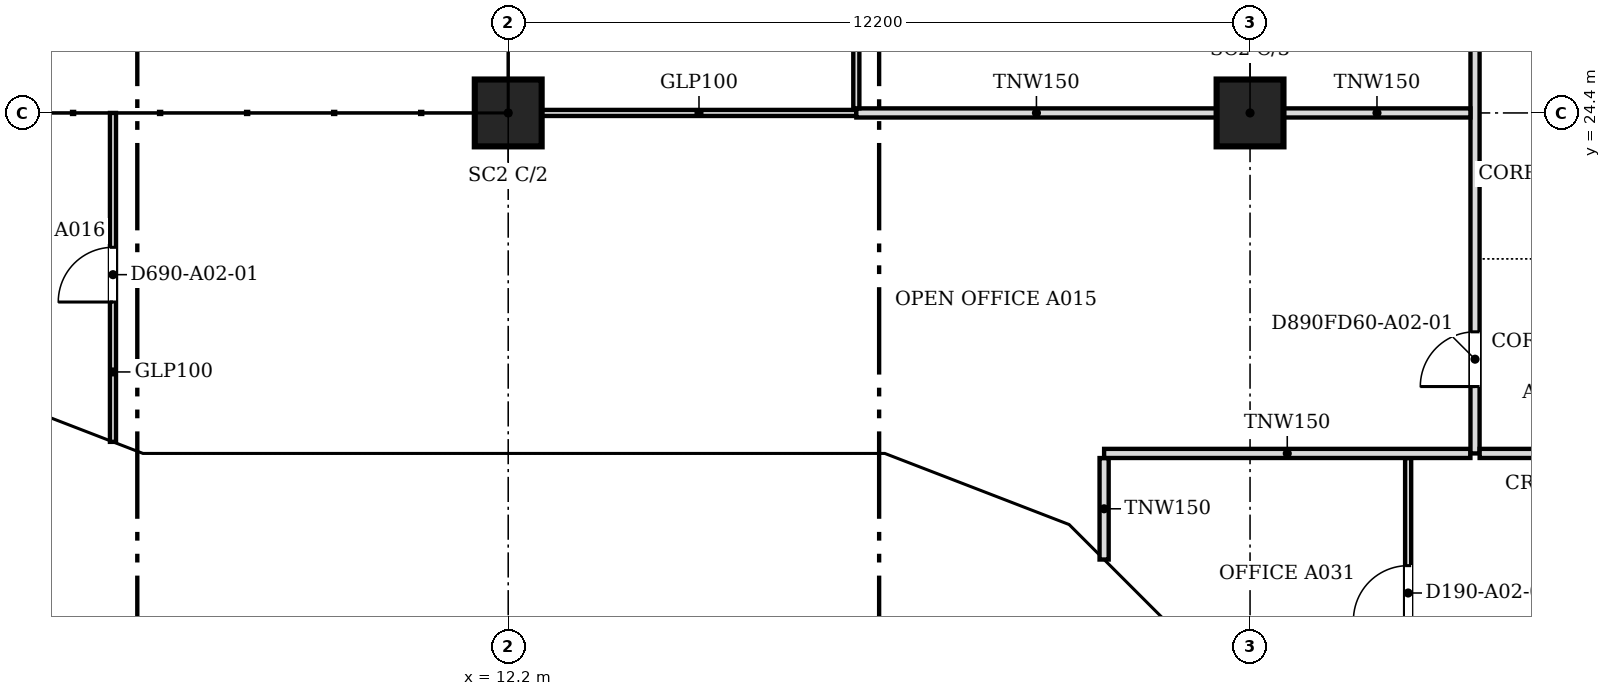
"""IFC4 building model, lengths in metres.
Left out: names, types, materials, properties, quantities, classifications, styles, units other than length and angle.
Written with IfcOpenShell. Run it as: python <this file> out.ifc"""

import sys

from ifc_helpers import new_model, si_unit, direction, frame, frame_2d, origin, origin_2d, place, context, subcontext, project, spatial, polyline, rectangle, outline, extrude, faceted_brep, source, transform, mapped, element, fill, save


model = new_model("IFC4")
c1 = context("Model", 3, precision=1e-05, world=origin(), true_north=direction((0.0, 1.0)))
c2 = subcontext(c1, "Body", "Model", "MODEL_VIEW")
j1 = project(units=[si_unit("LENGTHUNIT", "METRE"), si_unit("PLANEANGLEUNIT", "RADIAN")], contexts=[c1])
p1 = place(None, origin())
s1 = spatial("IfcSite", under=j1, at=p1, CompositionType="ELEMENT")
p2 = place(p1, origin())
s2 = spatial("IfcBuilding", under=s1, at=p2, CompositionType="ELEMENT")
p3 = place(p2, frame((0.0, 0.0, 25.8)))
s3 = spatial("IfcBuildingStorey", under=s2, at=p3, CompositionType="ELEMENT", Elevation=25.8)
for number, where, z_axis, x_axis in (
    (1, (12.2, 24.4, 0.0), (0.0, 0.0, 1.0), (1.0, 0.0, 0.0)),
    (2, (24.4, 24.4, 0.0), (0.0, 0.0, 1.0), (1.0, 0.0, 0.0)),
):
    element("IfcColumn", number, at=place(p3, frame(where, z_axis=z_axis, x_axis=x_axis)), inside=s3, PredefinedType="COLUMN", context=c2, shape_type="SweptSolid", body=[
        extrude(rectangle(XDim=1.1, YDim=1.1, at=origin_2d()), origin(), (0.0, 0.0, 1.0), 3.6),
    ])
m1 = source(origin(), c2, "Body", "Brep", [
    faceted_brep([(2.997, -0.25, 3.741), (2.95, -0.25, 3.8), (0.0, -0.25, 0.0), (2.997, -0.25, 0.0), (0.053, 0.25, 0.068), (2.904, 0.25, 3.74), (2.904, 0.25, 0.0), (0.053, 0.25, 0.0), (2.95, 0.0, 3.8), (0.0, 0.0, 0.0)], [[[0, 1, 2, 3]], [[4, 5, 6, 7]], [[8, 1, 0]], [[5, 4, 9, 2, 1, 8]], [[7, 6, 3, 2, 9]], [[7, 9, 4]], [[3, 6, 5, 8, 0]]]),
])
p4 = place(p3, frame((3.394, 19.612, 0.0), z_axis=(0.0, 0.0, 1.0), x_axis=(0.932990326376, -0.359901446078, 0.0)))
e3 = element("IfcWall", 3, at=p4, inside=s3, PredefinedType="SOLIDWALL", context=c2, shape_type="MappedRepresentation", body=[
    mapped(m1, transform((0.0, 0.0, 0.0), scale=1.0)),
])
m2 = source(origin(), c2, "Body", "SweptSolid", [
    extrude(outline(polyline([(2.75, 3.135), (0.511, 0.25), (2.75, 0.25), (2.75, 3.135)])), frame((0.0, 0.26, 0.0), z_axis=(0.0, -1.0, 0.0), x_axis=(1.0, 0.0, 0.0)), (0.0, 0.0, 1.0), 0.52),
])
p5 = place(p4, origin())
e4 = element("IfcOpeningElement", 4, at=p5, cuts=e3, PredefinedType="OPENING", context=c2, shape_type="MappedRepresentation", body=[
    mapped(m2, transform((0.0, 0.0, 0.0), scale=1.0)),
])
m3 = source(origin(), c2, "Body", "Brep", [
    faceted_brep([(3.05, -0.25, 0.0), (0.047, -0.25, 3.8), (0.0, -0.25, 3.74), (0.0, -0.25, 0.0), (0.093, 0.25, 3.741), (3.05, 0.25, 0.0), (0.093, 0.25, 0.0), (0.047, 0.0, 3.8)], [[[0, 1, 2, 3]], [[4, 5, 6]], [[5, 4, 7, 1, 0]], [[2, 1, 7]], [[6, 5, 0, 3]], [[6, 3, 2, 7, 4]]]),
])
p6 = place(p3, frame((6.1, 18.55, 0.0), z_axis=(0.0, 0.0, 1.0), x_axis=(1.0, 0.0, 0.0)))
e5 = element("IfcWall", 5, at=p6, inside=s3, PredefinedType="SOLIDWALL", context=c2, shape_type="MappedRepresentation", body=[
    mapped(m3, transform((0.0, 0.0, 0.0), scale=1.0)),
])
m4 = source(origin(), c2, "Body", "SweptSolid", [
    extrude(outline(polyline([(2.534, 0.25), (0.247, 3.144), (0.247, 0.25), (2.534, 0.25)])), frame((0.0, 0.26, 0.0), z_axis=(0.0, -1.0, 0.0), x_axis=(1.0, 0.0, 0.0)), (0.0, 0.0, 1.0), 0.52),
])
p7 = place(p6, origin())
e6 = element("IfcOpeningElement", 6, at=p7, cuts=e5, PredefinedType="OPENING", context=c2, shape_type="MappedRepresentation", body=[
    mapped(m4, transform((0.0, 0.0, 0.0), scale=1.0)),
])
m5 = source(origin(), c2, "Body", "SweptSolid", [
    extrude(outline(polyline([(6.1, 0.0), (3.05, 3.8), (0.0, 0.0), (6.1, 0.0)])), frame((0.0, 0.25, 0.0), z_axis=(0.0, -1.0, 0.0), x_axis=(1.0, 0.0, 0.0)), (0.0, 0.0, 1.0), 0.5),
])
p8 = place(p3, frame((9.15, 18.55, 0.0), z_axis=(0.0, 0.0, 1.0), x_axis=(1.0, 0.0, 0.0)))
e7 = element("IfcWall", 7, at=p8, inside=s3, PredefinedType="SOLIDWALL", context=c2, shape_type="MappedRepresentation", body=[
    mapped(m5, transform((0.0, 0.0, 0.0), scale=1.0)),
])
m6 = source(origin(), c2, "Body", "SweptSolid", [
    extrude(outline(polyline([(5.579, 0.25), (3.05, 3.401), (0.521, 0.25), (5.579, 0.25)])), frame((0.0, 0.26, 0.0), z_axis=(0.0, -1.0, 0.0), x_axis=(1.0, 0.0, 0.0)), (0.0, 0.0, 1.0), 0.52),
])
p9 = place(p8, origin())
e8 = element("IfcOpeningElement", 8, at=p9, cuts=e7, PredefinedType="OPENING", context=c2, shape_type="MappedRepresentation", body=[
    mapped(m6, transform((0.0, 0.0, 0.0), scale=1.0)),
])
m7 = source(origin(), c2, "Body", "Brep", [
    faceted_brep([(3.05, -0.25, 3.743), (0.0, -0.25, 0.0), (3.05, -0.25, 0.0), (0.0, 0.25, 0.0), (3.096, 0.25, 3.8), (3.143, 0.25, 3.744), (3.143, 0.25, 0.0), (3.096, -0.0, 3.8)], [[[0, 1, 2]], [[3, 4, 5, 6]], [[5, 4, 7]], [[4, 3, 1, 0, 7]], [[3, 6, 2, 1]], [[2, 6, 5, 7, 0]]]),
])
p10 = place(p3, frame((15.25, 18.55, 0.0), z_axis=(0.0, 0.0, 1.0), x_axis=(1.0, 0.0, 0.0)))
e9 = element("IfcWall", 9, at=p10, inside=s3, PredefinedType="SOLIDWALL", context=c2, shape_type="MappedRepresentation", body=[
    mapped(m7, transform((0.0, 0.0, 0.0), scale=1.0)),
])
m8 = source(origin(), c2, "Body", "SweptSolid", [
    extrude(outline(polyline([(2.896, 3.159), (0.526, 0.25), (2.896, 0.25), (2.896, 3.159)])), frame((0.0, 0.26, 0.0), z_axis=(0.0, -1.0, 0.0), x_axis=(1.0, 0.0, 0.0)), (0.0, 0.0, 1.0), 0.52),
])
p11 = place(p10, origin())
e10 = element("IfcOpeningElement", 10, at=p11, cuts=e9, PredefinedType="OPENING", context=c2, shape_type="MappedRepresentation", body=[
    mapped(m8, transform((0.0, 0.0, 0.0), scale=1.0)),
])
m9 = source(origin(), c2, "Body", "Brep", [
    faceted_brep([(3.143, -0.25, 0.064), (0.093, -0.25, 3.744), (0.093, -0.25, 0.0), (3.143, -0.25, 0.0), (0.0, 0.25, 3.743), (0.047, 0.25, 3.8), (3.196, 0.25, 0.0), (0.0, 0.25, 0.0), (0.047, 0.0, 3.8), (3.196, -0.0, 0.0)], [[[0, 1, 2, 3]], [[4, 5, 6, 7]], [[6, 5, 8, 1, 0, 9]], [[5, 4, 8]], [[7, 6, 9, 3, 2]], [[7, 2, 1, 8, 4]], [[3, 9, 0]]]),
])
p12 = place(p3, frame((18.303, 18.567, 0.0), z_axis=(0.0, 0.0, 1.0), x_axis=(0.932978940178, -0.359930961693, 0.0)))
e11 = element("IfcWall", 11, at=p12, inside=s3, PredefinedType="SOLIDWALL", context=c2, shape_type="MappedRepresentation", body=[
    mapped(m9, transform((0.0, 0.0, 0.0), scale=1.0)),
])
m10 = source(origin(), c2, "Body", "SweptSolid", [
    extrude(outline(polyline([(2.664, 0.25), (0.247, 3.167), (0.247, 0.25), (2.664, 0.25)])), frame((0.0, 0.26, 0.0), z_axis=(0.0, -1.0, 0.0), x_axis=(1.0, 0.0, 0.0)), (0.0, 0.0, 1.0), 0.52),
])
p13 = place(p12, origin())
e12 = element("IfcOpeningElement", 12, at=p13, cuts=e11, PredefinedType="OPENING", context=c2, shape_type="MappedRepresentation", body=[
    mapped(m10, transform((0.0, 0.0, 0.0), scale=1.0)),
])
m11 = source(origin(), c2, "Body", "Brep", [
    faceted_brep([(3.103, -0.25, 3.736), (0.053, -0.25, 0.064), (0.053, -0.25, 0.0), (3.103, -0.25, 0.0), (0.0, 0.25, 0.0), (3.156, 0.25, 3.8), (3.209, 0.25, 3.736), (3.209, 0.25, 0.0), (3.156, -0.0, 3.8), (0.0, 0.0, 0.0)], [[[0, 1, 2, 3]], [[4, 5, 6, 7]], [[6, 5, 8]], [[5, 4, 9, 1, 0, 8]], [[4, 7, 3, 2, 9]], [[9, 2, 1]], [[3, 7, 6, 8, 0]]]),
])
p14 = place(p3, frame((21.285, 17.417, 0.0), z_axis=(0.0, 0.0, 1.0), x_axis=(0.707106781187, -0.707106781187, 0.0)))
e13 = element("IfcWall", 13, at=p14, inside=s3, PredefinedType="SOLIDWALL", context=c2, shape_type="MappedRepresentation", body=[
    mapped(m11, transform((0.0, 0.0, 0.0), scale=1.0)),
])
m12 = source(origin(), c2, "Body", "SweptSolid", [
    extrude(outline(polyline([(2.956, 3.168), (0.533, 0.25), (2.956, 0.25), (2.956, 3.168)])), frame((0.0, 0.26, 0.0), z_axis=(0.0, -1.0, 0.0), x_axis=(1.0, 0.0, 0.0)), (0.0, 0.0, 1.0), 0.52),
])
p15 = place(p14, origin())
e14 = element("IfcOpeningElement", 14, at=p15, cuts=e13, PredefinedType="OPENING", context=c2, shape_type="MappedRepresentation", body=[
    mapped(m12, transform((0.0, 0.0, 0.0), scale=1.0)),
])
p16 = place(p2, frame((0.0, 0.0, 29.6)))
s4 = spatial("IfcBuildingStorey", under=s2, at=p16, CompositionType="ELEMENT", Elevation=29.6)
m13 = source(origin(), c2, "Body", "Brep", [
    faceted_brep([(0.053, -0.25, 0.0), (3.003, -0.25, 3.8), (0.053, -0.25, 7.6), (0.0, -0.25, 7.531), (0.0, -0.25, 0.068), (0.106, 0.25, 7.532), (2.957, 0.25, 3.86), (2.957, 0.25, 3.74), (0.106, 0.25, 0.068), (3.003, 0.0, 3.8), (0.053, 0.0, 0.0), (0.053, 0.0, 7.6)], [[[0, 1, 2, 3, 4]], [[5, 6, 7, 8]], [[8, 7, 9, 1, 0, 10]], [[6, 5, 11, 2, 1, 9]], [[3, 2, 11]], [[10, 0, 4]], [[8, 10, 4, 3, 11, 5]], [[7, 6, 9]]]),
])
p17 = place(p16, frame((3.344, 19.631, -3.8), z_axis=(0.0, 0.0, 1.0), x_axis=(0.933007896601, -0.359855894603, 0.0)))
e15 = element("IfcWall", 15, at=p17, inside=s4, PredefinedType="SOLIDWALL", context=c2, shape_type="MappedRepresentation", body=[
    mapped(m13, transform((0.0, 0.0, 0.0), scale=1.0)),
])
m14 = source(origin(), c2, "Body", "SweptSolid", [
    extrude(outline(polyline([(0.253, 0.665), (2.687, 3.8), (0.253, 6.935), (0.253, 0.665)])), frame((0.0, 0.26, 0.0), z_axis=(0.0, -1.0, 0.0), x_axis=(1.0, 0.0, 0.0)), (0.0, 0.0, 1.0), 0.52),
])
p18 = place(p17, origin())
e16 = element("IfcOpeningElement", 16, at=p18, cuts=e15, PredefinedType="OPENING", context=c2, shape_type="MappedRepresentation", body=[
    mapped(m14, transform((0.0, 0.0, 0.0), scale=1.0)),
])
m15 = source(origin(), c2, "Body", "Brep", [
    faceted_brep([(3.003, -0.25, 0.0), (6.053, -0.25, 3.8), (3.003, -0.25, 7.6), (0.0, -0.25, 3.8), (0.047, 0.25, 3.859), (3.003, 0.25, 7.6), (6.053, 0.25, 3.8), (3.003, 0.25, 0.0), (0.047, 0.25, 3.741), (0.0, 0.0, 3.8)], [[[0, 1, 2, 3]], [[4, 5, 6, 7, 8]], [[7, 6, 1, 0]], [[6, 5, 2, 1]], [[5, 4, 9, 3, 2]], [[8, 7, 0, 3, 9]], [[8, 9, 4]]]),
])
p19 = place(p16, frame((6.146, 18.55, -3.8), z_axis=(0.0, 0.0, 1.0), x_axis=(1.0, 0.0, 0.0)))
e17 = element("IfcWall", 17, at=p19, inside=s4, PredefinedType="SOLIDWALL", context=c2, shape_type="MappedRepresentation", body=[
    mapped(m15, transform((0.0, 0.0, 0.0), scale=1.0)),
])
m16 = source(origin(), c2, "Body", "SweptSolid", [
    extrude(outline(polyline([(3.005, 0.401), (5.733, 3.8), (3.005, 7.199), (0.319, 3.8), (3.005, 0.401)])), frame((0.0, 0.26, 0.0), z_axis=(0.0, -1.0, 0.0), x_axis=(1.0, 0.0, 0.0)), (0.0, 0.0, 1.0), 0.52),
])
p20 = place(p19, origin())
e18 = element("IfcOpeningElement", 18, at=p20, cuts=e17, PredefinedType="OPENING", context=c2, shape_type="MappedRepresentation", body=[
    mapped(m16, transform((0.0, 0.0, 0.0), scale=1.0)),
])
m17 = source(origin(), c2, "Body", "Brep", [
    faceted_brep([(3.05, -0.25, 0.0), (6.1, -0.25, 3.743), (6.1, -0.25, 3.857), (3.05, -0.25, 7.6), (0.0, -0.25, 3.8), (0.0, 0.25, 3.8), (3.05, 0.25, 7.6), (6.146, 0.25, 3.8), (3.05, 0.25, 0.0), (6.146, -0.0, 3.8)], [[[0, 1, 2, 3, 4]], [[5, 6, 7, 8]], [[8, 7, 9, 1, 0]], [[7, 6, 3, 2, 9]], [[6, 5, 4, 3]], [[5, 8, 0, 4]], [[1, 9, 2]]]),
])
p21 = place(p16, frame((12.2, 18.55, -3.8), z_axis=(0.0, 0.0, 1.0), x_axis=(1.0, 0.0, 0.0)))
e19 = element("IfcWall", 19, at=p21, inside=s4, PredefinedType="SOLIDWALL", context=c2, shape_type="MappedRepresentation", body=[
    mapped(m17, transform((0.0, 0.0, 0.0), scale=1.0)),
])
m18 = source(origin(), c2, "Body", "SweptSolid", [
    extrude(outline(polyline([(3.052, 0.397), (5.824, 3.8), (3.052, 7.202), (0.321, 3.8), (3.052, 0.397)])), frame((0.0, 0.26, 0.0), z_axis=(0.0, -1.0, 0.0), x_axis=(1.0, 0.0, 0.0)), (0.0, 0.0, 1.0), 0.52),
])
p22 = place(p21, origin())
e20 = element("IfcOpeningElement", 20, at=p22, cuts=e19, PredefinedType="OPENING", context=c2, shape_type="MappedRepresentation", body=[
    mapped(m18, transform((0.0, 0.0, 0.0), scale=1.0)),
])
m19 = source(origin(), c2, "Body", "Brep", [
    faceted_brep([(3.096, -0.25, 7.536), (0.047, -0.25, 3.856), (0.047, -0.25, 3.744), (3.096, -0.25, 0.064), (0.0, 0.25, 3.8), (3.149, 0.25, 7.6), (3.202, 0.25, 7.536), (3.202, 0.25, 0.064), (3.149, 0.25, 0.0), (3.149, -0.0, 0.0), (3.149, -0.0, 7.6), (0.0, 0.0, 3.8)], [[[0, 1, 2, 3]], [[4, 5, 6, 7, 8]], [[8, 7, 9]], [[6, 5, 10]], [[5, 4, 11, 1, 0, 10]], [[4, 8, 9, 3, 2, 11]], [[2, 1, 11]], [[3, 9, 7, 6, 10, 0]]]),
])
p23 = place(p16, frame((18.346, 18.55, -3.8), z_axis=(0.0, 0.0, 1.0), x_axis=(0.932985567668, -0.359913782069, 0.0)))
e21 = element("IfcWall", 21, at=p23, inside=s4, PredefinedType="SOLIDWALL", context=c2, shape_type="MappedRepresentation", body=[
    mapped(m19, transform((0.0, 0.0, 0.0), scale=1.0)),
])
m20 = source(origin(), c2, "Body", "SweptSolid", [
    extrude(outline(polyline([(2.949, 6.967), (0.325, 3.8), (2.949, 0.633), (2.949, 6.967)])), frame((0.0, 0.26, 0.0), z_axis=(0.0, -1.0, 0.0), x_axis=(1.0, 0.0, 0.0)), (0.0, 0.0, 1.0), 0.52),
])
p24 = place(p23, origin())
e22 = element("IfcOpeningElement", 22, at=p24, cuts=e21, PredefinedType="OPENING", context=c2, shape_type="MappedRepresentation", body=[
    mapped(m20, transform((0.0, 0.0, 0.0), scale=1.0)),
])
m21 = source(origin(), c2, "Body", "Brep", [
    faceted_brep([(0.106, -0.25, 0.064), (3.156, -0.25, 3.736), (3.156, -0.25, 3.864), (0.106, -0.25, 7.536), (0.0, 0.25, 7.536), (0.053, 0.25, 7.6), (3.209, 0.25, 3.8), (0.053, 0.25, 0.0), (0.0, 0.25, 0.064), (3.209, -0.0, 3.8), (0.053, 0.0, 0.0), (0.053, 0.0, 7.6)], [[[0, 1, 2, 3]], [[4, 5, 6, 7, 8]], [[7, 6, 9, 1, 0, 10]], [[6, 5, 11, 3, 2, 9]], [[5, 4, 11]], [[8, 7, 10]], [[8, 10, 0, 3, 11, 4]], [[1, 9, 2]]]),
])
p25 = place(p16, frame((21.248, 17.454, -3.8), z_axis=(0.0, 0.0, 1.0), x_axis=(0.707106781187, -0.707106781187, 0.0)))
e23 = element("IfcWall", 23, at=p25, inside=s4, PredefinedType="SOLIDWALL", context=c2, shape_type="MappedRepresentation", body=[
    mapped(m21, transform((0.0, 0.0, 0.0), scale=1.0)),
])
m22 = source(origin(), c2, "Body", "SweptSolid", [
    extrude(outline(polyline([(0.253, 0.632), (2.884, 3.8), (0.253, 6.968), (0.253, 0.632)])), frame((0.0, 0.26, 0.0), z_axis=(0.0, -1.0, 0.0), x_axis=(1.0, 0.0, 0.0)), (0.0, 0.0, 1.0), 0.52),
])
p26 = place(p25, origin())
e24 = element("IfcOpeningElement", 24, at=p26, cuts=e23, PredefinedType="OPENING", context=c2, shape_type="MappedRepresentation", body=[
    mapped(m22, transform((0.0, 0.0, 0.0), scale=1.0)),
])
p27 = place(p3, frame((27.0, 10.276, 0.0), z_axis=(0.0, 0.0, 1.0), x_axis=(0.0, 1.0, 0.0)))
e25 = element("IfcWall", 25, at=p27, inside=s3, PredefinedType="PARTITIONING", context=c2, shape_type="SweptSolid", body=[
    extrude(rectangle(XDim=8.448, YDim=0.1, at=frame_2d((4.224, 0.0))), origin(), (0.0, 0.0, 1.0), 3.067),
])
m23 = source(origin(), c2, "Body", "SweptSolid", [
    extrude(rectangle(XDim=0.9, YDim=2.1, at=frame_2d((0.45, 1.05))), frame((0.0, 0.06, 0.0), z_axis=(0.0, -1.0, 0.0), x_axis=(1.0, 0.0, 0.0)), (0.0, 0.0, 1.0), 0.12),
])
p28 = place(p27, frame((1.6, 0.0, 0.0)))
e26 = element("IfcOpeningElement", 26, at=p28, cuts=e25, PredefinedType="OPENING", context=c2, shape_type="MappedRepresentation", body=[
    mapped(m23, transform((0.0, 0.0, 0.0), scale=1.0)),
])
p29 = place(p27, frame((5.779, 0.0, 0.0)))
e27 = element("IfcOpeningElement", 27, at=p29, cuts=e25, PredefinedType="OPENING", context=c2, shape_type="MappedRepresentation", body=[
    mapped(m23, transform((0.0, 0.0, 0.0), scale=1.0)),
])
p30 = place(p3, frame((22.0, 17.055, 0.0), z_axis=(0.0, 0.0, 1.0), x_axis=(0.0, 1.0, 0.0)))
e28 = element("IfcWall", 28, at=p30, inside=s3, PredefinedType="PARTITIONING", context=c2, shape_type="SweptSolid", body=[
    extrude(rectangle(XDim=1.669, YDim=0.15, at=frame_2d((0.834, 0.0))), origin(), (0.0, 0.0, 1.0), 3.067),
])
p31 = place(p3, frame((22.0, 18.8, 0.0), z_axis=(0.0, 0.0, 1.0), x_axis=(1.0, 0.0, 0.0)))
e29 = element("IfcWall", 29, at=p31, inside=s3, PredefinedType="PARTITIONING", context=c2, shape_type="SweptSolid", body=[
    extrude(rectangle(XDim=6.024, YDim=0.15, at=frame_2d((3.012, 0.0))), origin(), (0.0, 0.0, 1.0), 3.067),
])
p32 = place(p3, frame((28.1, 18.8, 0.0), z_axis=(0.0, 0.0, 1.0), x_axis=(0.0, 1.0, 0.0)))
e30 = element("IfcWall", 30, at=p32, inside=s3, PredefinedType="PARTITIONING", context=c2, shape_type="SweptSolid", body=[
    extrude(rectangle(XDim=26.5, YDim=0.15, at=frame_2d((13.25, 0.0))), origin(), (0.0, 0.0, 1.0), 3.067),
])
m24 = source(origin(), c2, "Body", "SweptSolid", [
    extrude(rectangle(XDim=0.9, YDim=2.1, at=frame_2d((0.45, 1.05))), frame((0.0, 0.085, 0.0), z_axis=(0.0, -1.0, 0.0), x_axis=(1.0, 0.0, 0.0)), (0.0, 0.0, 1.0), 0.17),
])
p33 = place(p32, frame((1.1, 0.0, 0.0)))
e31 = element("IfcOpeningElement", 31, at=p33, cuts=e30, PredefinedType="OPENING", context=c2, shape_type="MappedRepresentation", body=[
    mapped(m24, transform((0.0, 0.0, 0.0), scale=1.0)),
])
m25 = source(origin(), c2, "Body", "SweptSolid", [
    extrude(rectangle(XDim=1.0, YDim=2.1, at=frame_2d((0.5, 1.05))), frame((0.0, 0.085, 0.0), z_axis=(0.0, -1.0, 0.0), x_axis=(1.0, 0.0, 0.0)), (0.0, 0.0, 1.0), 0.17),
])
p34 = place(p32, frame((23.151, 0.0, 0.0)))
e32 = element("IfcOpeningElement", 32, at=p34, cuts=e30, PredefinedType="OPENING", context=c2, shape_type="MappedRepresentation", body=[
    mapped(m25, transform((0.0, 0.0, 0.0), scale=1.0)),
])
p35 = place(p32, frame((8.2, 0.0, 0.0)))
e33 = element("IfcOpeningElement", 33, at=p35, cuts=e30, PredefinedType="OPENING", context=c2, shape_type="MappedRepresentation", body=[
    mapped(m24, transform((0.0, 0.0, 0.0), scale=1.0)),
])
p36 = place(p32, frame((15.8, 0.0, 0.0)))
e34 = element("IfcOpeningElement", 34, at=p36, cuts=e30, PredefinedType="OPENING", context=c2, shape_type="MappedRepresentation", body=[
    mapped(m25, transform((0.0, 0.0, 0.0), scale=1.0)),
])
p37 = place(p3, frame((28.176, 18.8, 0.0), z_axis=(0.0, 0.0, 1.0), x_axis=(1.0, 0.0, 0.0)))
e35 = element("IfcWall", 35, at=p37, inside=s3, PredefinedType="PARTITIONING", context=c2, shape_type="SweptSolid", body=[
    extrude(rectangle(XDim=2.248, YDim=0.15, at=frame_2d((1.124, 0.0))), origin(), (0.0, 0.0, 1.0), 3.067),
])
p38 = place(p3, frame((5.7, 18.99, 0.0), z_axis=(0.0, 0.0, 1.0), x_axis=(0.0, 1.0, 0.0)))
e36 = element("IfcWall", 36, at=p38, inside=s3, PredefinedType="PARTITIONING", context=c2, shape_type="SweptSolid", body=[
    extrude(rectangle(XDim=5.41, YDim=0.1, at=frame_2d((2.705, 0.0))), origin(), (0.0, 0.0, 1.0), 3.067),
])
p39 = place(p38, frame((2.3, 0.0, 0.0)))
e37 = element("IfcOpeningElement", 37, at=p39, cuts=e36, PredefinedType="OPENING", context=c2, shape_type="MappedRepresentation", body=[
    mapped(m23, transform((0.0, 0.0, 0.0), scale=1.0)),
])
p40 = place(p3, frame((12.751, 24.4, 0.0), z_axis=(0.0, 0.0, 1.0), x_axis=(1.0, 0.0, 0.0)))
e38 = element("IfcWall", 38, at=p40, inside=s3, PredefinedType="PARTITIONING", context=c2, shape_type="SweptSolid", body=[
    extrude(rectangle(XDim=5.173, YDim=0.1, at=frame_2d((2.586, 0.0))), origin(), (0.0, 0.0, 1.0), 3.067),
])
p41 = place(p3, frame((17.925, 24.4, 0.0), z_axis=(0.0, 0.0, 1.0), x_axis=(1.0, 0.0, 0.0)))
e39 = element("IfcWall", 39, at=p41, inside=s3, PredefinedType="PARTITIONING", context=c2, shape_type="SweptSolid", body=[
    extrude(rectangle(XDim=5.924, YDim=0.15, at=frame_2d((2.962, 0.0))), origin(), (0.0, 0.0, 1.0), 3.067),
])
p42 = place(p3, frame((24.951, 24.4, 0.0), z_axis=(0.0, 0.0, 1.0), x_axis=(1.0, 0.0, 0.0)))
e40 = element("IfcWall", 40, at=p42, inside=s3, PredefinedType="PARTITIONING", context=c2, shape_type="SweptSolid", body=[
    extrude(rectangle(XDim=3.073, YDim=0.15, at=frame_2d((1.537, 0.0))), origin(), (0.0, 0.0, 1.0), 3.067),
])
p43 = place(p3, frame((17.925, 24.476, 0.0), z_axis=(0.0, 0.0, 1.0), x_axis=(0.0, 1.0, 0.0)))
e41 = element("IfcWall", 41, at=p43, inside=s3, PredefinedType="PARTITIONING", context=c2, shape_type="SweptSolid", body=[
    extrude(rectangle(XDim=5.948, YDim=0.1, at=frame_2d((2.974, 0.0))), origin(), (0.0, 0.0, 1.0), 3.067),
])
p44 = place(p43, frame((2.5, 0.0, 0.0)))
e42 = element("IfcOpeningElement", 42, at=p44, cuts=e41, PredefinedType="OPENING", context=c2, shape_type="MappedRepresentation", body=[
    mapped(m23, transform((0.0, 0.0, 0.0), scale=1.0)),
])
m26 = source(origin(), c2, "Body", "SweptSolid", [
    extrude(rectangle(XDim=0.9, YDim=2.1, at=frame_2d((0.45, 1.05))), frame((0.0, 0.025, 0.0), z_axis=(0.0, -1.0, 0.0), x_axis=(1.0, 0.0, 0.0)), (0.0, 0.0, 1.0), 0.05),
])
p45 = place(p33, origin())
e43 = element("IfcDoor", 43, at=p45, inside=s3, OperationType="SINGLE_SWING_LEFT", PredefinedType="DOOR", context=c2, shape_type="MappedRepresentation", body=[
    mapped(m26, transform((0.0, 0.0, 0.0), scale=1.0)),
])
fill(e31, e43)
p46 = place(p29, origin())
e44 = element("IfcDoor", 44, at=p46, inside=s3, OperationType="SINGLE_SWING_LEFT", PredefinedType="DOOR", context=c2, shape_type="MappedRepresentation", body=[
    mapped(m26, transform((0.0, 0.0, 0.0), scale=1.0)),
])
fill(e27, e44)
p47 = place(p39, origin())
e45 = element("IfcDoor", 45, at=p47, inside=s3, OperationType="SINGLE_SWING_LEFT", PredefinedType="DOOR", context=c2, shape_type="MappedRepresentation", body=[
    mapped(m26, transform((0.0, 0.0, 0.0), scale=1.0)),
])
fill(e37, e45)
save(model, sys.argv[1])
